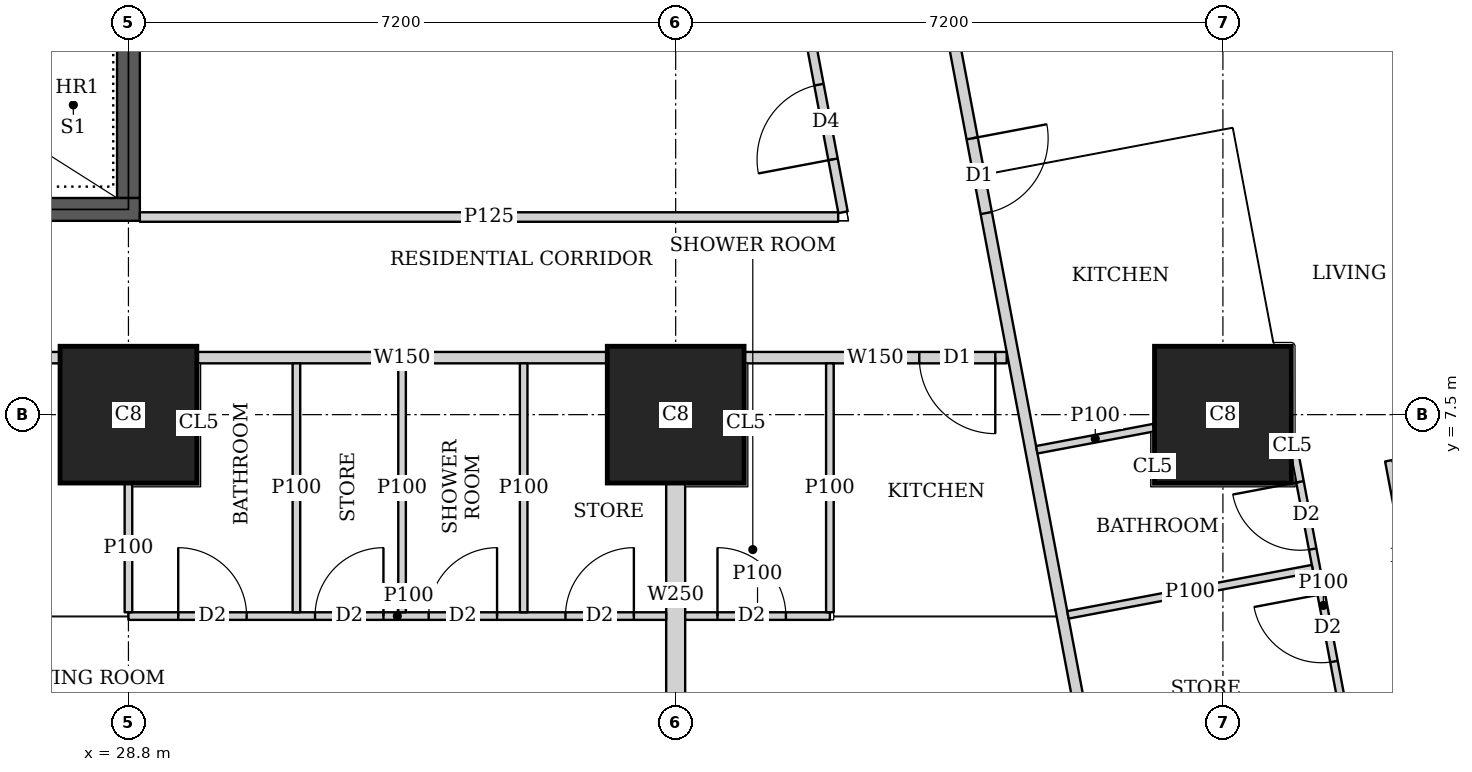
"""IFC4 building model, lengths in metres.
Left out: names, types, materials, properties, quantities, classifications, styles, units other than length and angle.
Written with IfcOpenShell. Run it as: python <this file> out.ifc"""

import sys

from ifc_helpers import new_model, si_unit, direction, frame, frame_2d, origin, origin_2d, place, context, subcontext, project, spatial, rectangle, extrude, element, fill, save


model = new_model("IFC4")
c1 = context("Model", 3, precision=1e-05, world=origin(), true_north=direction((0.0, 1.0)))
c2 = subcontext(c1, "Body", "Model", "MODEL_VIEW")
j1 = project(units=[si_unit("LENGTHUNIT", "METRE"), si_unit("PLANEANGLEUNIT", "RADIAN")], contexts=[c1])
p1 = place(None, origin())
s1 = spatial("IfcSite", under=j1, at=p1, CompositionType="ELEMENT")
p2 = place(p1, origin())
s2 = spatial("IfcBuilding", under=s1, at=p2, CompositionType="ELEMENT")
p3 = place(p2, frame((0.0, 0.0, 31.25)))
s3 = spatial("IfcBuildingStorey", under=s2, at=p3, CompositionType="ELEMENT", Elevation=31.25)
for number, where, z_axis, x_axis in (
    (1, (28.8, 7.5, 0.0), (0.0, 0.0, 1.0), (1.0, 0.0, 0.0)),
    (2, (36.0, 7.5, 0.0), (0.0, 0.0, 1.0), (1.0, 0.0, 0.0)),
    (3, (43.2, 7.5, 0.0), (0.0, 0.0, 1.0), (1.0, 0.0, 0.0)),
):
    element("IfcColumn", number, at=place(p3, frame(where, z_axis=z_axis, x_axis=x_axis)), inside=s3, PredefinedType="COLUMN", context=c2, shape_type="SweptSolid", body=[
        extrude(rectangle(XDim=1.8, YDim=1.8, at=origin_2d()), origin(), (0.0, 0.0, 1.0), 3.75),
    ])
p4 = place(p3, frame((21.45, 10.2, 0.0), z_axis=(0.0, 0.0, 1.0), x_axis=(1.0, 0.0, 0.0)))
e4 = element("IfcWall", 4, at=p4, inside=s3, PredefinedType="SHEAR", context=c2, shape_type="SweptSolid", body=[
    extrude(rectangle(XDim=7.5, YDim=0.3, at=frame_2d((3.75, 0.0))), origin(), (0.0, 0.0, 1.0), 3.75),
])
p5 = place(p4, frame((0.5, 0.0, 0.0)))
e5 = element("IfcOpeningElement", 5, at=p5, cuts=e4, PredefinedType="OPENING", context=c2, shape_type="SweptSolid", body=[
    extrude(rectangle(XDim=1.1, YDim=2.1, at=frame_2d((0.55, 1.05))), frame((0.0, 0.16, 0.0), z_axis=(0.0, -1.0, 0.0), x_axis=(1.0, 0.0, 0.0)), (0.0, 0.0, 1.0), 0.32),
])
p6 = place(p3, frame((28.8, 10.35, 0.0), z_axis=(0.0, 0.0, 1.0), x_axis=(0.0, 1.0, 0.0)))
e6 = element("IfcWall", 6, at=p6, inside=s3, PredefinedType="SHEAR", context=c2, shape_type="SweptSolid", body=[
    extrude(rectangle(XDim=4.2, YDim=0.3, at=frame_2d((2.1, 0.0))), origin(), (0.0, 0.0, 1.0), 3.75),
])
p7 = place(p3, frame((50.653, 2.703, 0.0), z_axis=(0.0, 0.0, 1.0), x_axis=(-0.185612026696, 0.982623109613, 0.0)))
e7 = element("IfcWall", 7, at=p7, inside=s3, PredefinedType="SOLIDWALL", context=c2, shape_type="SweptSolid", body=[
    extrude(rectangle(XDim=41.393, YDim=0.2, at=frame_2d((20.697, 0.0))), origin(), (0.0, 0.0, 1.0), 3.5),
])
p8 = place(p7, frame((1.633, 0.0, 0.9)))
e8 = element("IfcOpeningElement", 8, at=p8, cuts=e7, PredefinedType="OPENING", context=c2, shape_type="SweptSolid", body=[
    extrude(rectangle(XDim=1.8, YDim=1.5, at=frame_2d((0.9, 0.75))), frame((0.0, 0.11, 0.0), z_axis=(0.0, -1.0, 0.0), x_axis=(1.0, 0.0, 0.0)), (0.0, 0.0, 1.0), 0.22),
])
p9 = place(p7, frame((6.032, 0.0, 0.9)))
e9 = element("IfcOpeningElement", 9, at=p9, cuts=e7, PredefinedType="OPENING", context=c2, shape_type="SweptSolid", body=[
    extrude(rectangle(XDim=1.8, YDim=1.5, at=frame_2d((0.9, 0.75))), frame((0.0, 0.11, 0.0), z_axis=(0.0, -1.0, 0.0), x_axis=(1.0, 0.0, 0.0)), (0.0, 0.0, 1.0), 0.22),
])
p10 = place(p7, frame((9.848, 0.0, 0.9)))
e10 = element("IfcOpeningElement", 10, at=p10, cuts=e7, PredefinedType="OPENING", context=c2, shape_type="SweptSolid", body=[
    extrude(rectangle(XDim=1.8, YDim=1.5, at=frame_2d((0.9, 0.75))), frame((0.0, 0.11, 0.0), z_axis=(0.0, -1.0, 0.0), x_axis=(1.0, 0.0, 0.0)), (0.0, 0.0, 1.0), 0.22),
])
p11 = place(p7, frame((17.481, 0.0, 0.9)))
e11 = element("IfcOpeningElement", 11, at=p11, cuts=e7, PredefinedType="OPENING", context=c2, shape_type="SweptSolid", body=[
    extrude(rectangle(XDim=1.8, YDim=1.5, at=frame_2d((0.9, 0.75))), frame((0.0, 0.11, 0.0), z_axis=(0.0, -1.0, 0.0), x_axis=(1.0, 0.0, 0.0)), (0.0, 0.0, 1.0), 0.22),
])
p12 = place(p7, frame((21.297, 0.0, 0.9)))
e12 = element("IfcOpeningElement", 12, at=p12, cuts=e7, PredefinedType="OPENING", context=c2, shape_type="SweptSolid", body=[
    extrude(rectangle(XDim=1.8, YDim=1.5, at=frame_2d((0.9, 0.75))), frame((0.0, 0.11, 0.0), z_axis=(0.0, -1.0, 0.0), x_axis=(1.0, 0.0, 0.0)), (0.0, 0.0, 1.0), 0.22),
])
p13 = place(p7, frame((25.113, 0.0, 0.9)))
e13 = element("IfcOpeningElement", 13, at=p13, cuts=e7, PredefinedType="OPENING", context=c2, shape_type="SweptSolid", body=[
    extrude(rectangle(XDim=1.8, YDim=1.5, at=frame_2d((0.9, 0.75))), frame((0.0, 0.11, 0.0), z_axis=(0.0, -1.0, 0.0), x_axis=(1.0, 0.0, 0.0)), (0.0, 0.0, 1.0), 0.22),
])
p14 = place(p7, frame((28.93, 0.0, 0.9)))
e14 = element("IfcOpeningElement", 14, at=p14, cuts=e7, PredefinedType="OPENING", context=c2, shape_type="SweptSolid", body=[
    extrude(rectangle(XDim=1.8, YDim=1.5, at=frame_2d((0.9, 0.75))), frame((0.0, 0.11, 0.0), z_axis=(0.0, -1.0, 0.0), x_axis=(1.0, 0.0, 0.0)), (0.0, 0.0, 1.0), 0.22),
])
p15 = place(p7, frame((32.746, 0.0, 0.9)))
e15 = element("IfcOpeningElement", 15, at=p15, cuts=e7, PredefinedType="OPENING", context=c2, shape_type="SweptSolid", body=[
    extrude(rectangle(XDim=1.8, YDim=1.5, at=frame_2d((0.9, 0.75))), frame((0.0, 0.11, 0.0), z_axis=(0.0, -1.0, 0.0), x_axis=(1.0, 0.0, 0.0)), (0.0, 0.0, 1.0), 0.22),
])
p16 = place(p7, frame((36.481, 0.0, 0.9)))
e16 = element("IfcOpeningElement", 16, at=p16, cuts=e7, PredefinedType="OPENING", context=c2, shape_type="SweptSolid", body=[
    extrude(rectangle(XDim=1.8, YDim=1.5, at=frame_2d((0.9, 0.75))), frame((0.0, 0.11, 0.0), z_axis=(0.0, -1.0, 0.0), x_axis=(1.0, 0.0, 0.0)), (0.0, 0.0, 1.0), 0.22),
])
p17 = place(p3, frame((40.355, 8.25, 0.0), z_axis=(0.0, 0.0, 1.0), x_axis=(-1.0, 0.0, 0.0)))
e17 = element("IfcWall", 17, at=p17, inside=s3, PredefinedType="SOLIDWALL", context=c2, shape_type="SweptSolid", body=[
    extrude(rectangle(XDim=3.454, YDim=0.15, at=frame_2d((1.727, 0.0))), origin(), (0.0, 0.0, 1.0), 3.5),
])
p18 = place(p17, frame((0.15, 0.0, 0.0)))
e18 = element("IfcOpeningElement", 18, at=p18, cuts=e17, PredefinedType="OPENING", context=c2, shape_type="SweptSolid", body=[
    extrude(rectangle(XDim=1.0, YDim=2.1, at=frame_2d((0.5, 1.05))), frame((0.0, 0.085, 0.0), z_axis=(0.0, -1.0, 0.0), x_axis=(1.0, 0.0, 0.0)), (0.0, 0.0, 1.0), 0.17),
])
p19 = place(p3, frame((35.099, 8.25, 0.0), z_axis=(0.0, 0.0, 1.0), x_axis=(-1.0, 0.0, 0.0)))
e19 = element("IfcWall", 19, at=p19, inside=s3, PredefinedType="SOLIDWALL", context=c2, shape_type="SweptSolid", body=[
    extrude(rectangle(XDim=5.398, YDim=0.15, at=frame_2d((2.699, 0.0))), origin(), (0.0, 0.0, 1.0), 3.5),
])
p20 = place(p3, frame((27.899, 8.25, 0.0), z_axis=(0.0, 0.0, 1.0), x_axis=(-1.0, 0.0, 0.0)))
e20 = element("IfcWall", 20, at=p20, inside=s3, PredefinedType="SOLIDWALL", context=c2, shape_type="SweptSolid", body=[
    extrude(rectangle(XDim=5.398, YDim=0.15, at=frame_2d((2.699, 0.0))), origin(), (0.0, 0.0, 1.0), 3.5),
])
p21 = place(p20, frame((0.799, 0.0, 0.0)))
e21 = element("IfcOpeningElement", 21, at=p21, cuts=e20, PredefinedType="OPENING", context=c2, shape_type="SweptSolid", body=[
    extrude(rectangle(XDim=1.0, YDim=2.1, at=frame_2d((0.5, 1.05))), frame((0.0, 0.085, 0.0), z_axis=(0.0, -1.0, 0.0), x_axis=(1.0, 0.0, 0.0)), (0.0, 0.0, 1.0), 0.17),
])
p22 = place(p3, frame((35.094, 36.585, 0.0), z_axis=(0.0, 0.0, 1.0), x_axis=(0.185588860311, -0.982627485331, 0.0)))
e22 = element("IfcWall", 22, at=p22, inside=s3, PredefinedType="SOLIDWALL", context=c2, shape_type="SweptSolid", body=[
    extrude(rectangle(XDim=34.797, YDim=0.15, at=frame_2d((17.399, 0.0))), origin(), (0.0, 0.0, 1.0), 2.5),
])
p23 = place(p22, frame((6.012, 0.0, 0.0)))
e23 = element("IfcOpeningElement", 23, at=p23, cuts=e22, PredefinedType="OPENING", context=c2, shape_type="SweptSolid", body=[
    extrude(rectangle(XDim=1.0, YDim=2.1, at=frame_2d((0.5, 1.05))), frame((0.0, 0.085, 0.0), z_axis=(0.0, -1.0, 0.0), x_axis=(1.0, 0.0, 0.0)), (0.0, 0.0, 1.0), 0.17),
])
p24 = place(p22, frame((9.828, 0.0, 0.0)))
e24 = element("IfcOpeningElement", 24, at=p24, cuts=e22, PredefinedType="OPENING", context=c2, shape_type="SweptSolid", body=[
    extrude(rectangle(XDim=1.0, YDim=2.1, at=frame_2d((0.5, 1.05))), frame((0.0, 0.085, 0.0), z_axis=(0.0, -1.0, 0.0), x_axis=(1.0, 0.0, 0.0)), (0.0, 0.0, 1.0), 0.17),
])
p25 = place(p22, frame((25.9, 0.0, 0.0)))
e25 = element("IfcOpeningElement", 25, at=p25, cuts=e22, PredefinedType="OPENING", context=c2, shape_type="SweptSolid", body=[
    extrude(rectangle(XDim=1.0, YDim=2.1, at=frame_2d((0.5, 1.05))), frame((0.0, 0.085, 0.0), z_axis=(0.0, -1.0, 0.0), x_axis=(1.0, 0.0, 0.0)), (0.0, 0.0, 1.0), 0.17),
])
p26 = place(p3, frame((35.875, 4.85, 0.0), z_axis=(0.0, 0.0, 1.0), x_axis=(-1.0, 0.0, 0.0)))
e26 = element("IfcWall", 26, at=p26, inside=s3, PredefinedType="PARTITIONING", context=c2, shape_type="SweptSolid", body=[
    extrude(rectangle(XDim=7.075, YDim=0.1, at=frame_2d((3.538, 0.0))), origin(), (0.0, 0.0, 1.0), 3.5),
])
p27 = place(p26, frame((5.52, 0.0, 0.0)))
e27 = element("IfcOpeningElement", 27, at=p27, cuts=e26, PredefinedType="OPENING", context=c2, shape_type="SweptSolid", body=[
    extrude(rectangle(XDim=0.9, YDim=2.1, at=frame_2d((0.45, 1.05))), frame((0.0, 0.06, 0.0), z_axis=(0.0, -1.0, 0.0), x_axis=(1.0, 0.0, 0.0)), (0.0, 0.0, 1.0), 0.12),
])
p28 = place(p26, frame((2.225, 0.0, 0.0)))
e28 = element("IfcOpeningElement", 28, at=p28, cuts=e26, PredefinedType="OPENING", context=c2, shape_type="SweptSolid", body=[
    extrude(rectangle(XDim=0.9, YDim=2.1, at=frame_2d((0.45, 1.05))), frame((0.0, 0.06, 0.0), z_axis=(0.0, -1.0, 0.0), x_axis=(1.0, 0.0, 0.0)), (0.0, 0.0, 1.0), 0.12),
])
p29 = place(p26, frame((3.72, 0.0, 0.0)))
e29 = element("IfcOpeningElement", 29, at=p29, cuts=e26, PredefinedType="OPENING", context=c2, shape_type="SweptSolid", body=[
    extrude(rectangle(XDim=0.9, YDim=2.1, at=frame_2d((0.45, 1.05))), frame((0.0, 0.06, 0.0), z_axis=(0.0, -1.0, 0.0), x_axis=(1.0, 0.0, 0.0)), (0.0, 0.0, 1.0), 0.12),
])
p30 = place(p26, frame((0.425, 0.0, 0.0)))
e30 = element("IfcOpeningElement", 30, at=p30, cuts=e26, PredefinedType="OPENING", context=c2, shape_type="SweptSolid", body=[
    extrude(rectangle(XDim=0.9, YDim=2.1, at=frame_2d((0.45, 1.05))), frame((0.0, 0.06, 0.0), z_axis=(0.0, -1.0, 0.0), x_axis=(1.0, 0.0, 0.0)), (0.0, 0.0, 1.0), 0.12),
])
p31 = place(p3, frame((28.8, 4.9, 0.0), z_axis=(0.0, 0.0, 1.0), x_axis=(0.0, 1.0, 0.0)))
e31 = element("IfcWall", 31, at=p31, inside=s3, PredefinedType="PARTITIONING", context=c2, shape_type="SweptSolid", body=[
    extrude(rectangle(XDim=1.699, YDim=0.1, at=frame_2d((0.85, 0.0))), origin(), (0.0, 0.0, 1.0), 3.5),
])
for number, where, z_axis, x_axis in (
    (32, (32.4, 4.9, 0.0), (0.0, 0.0, 1.0), (0.0, 1.0, 0.0)),
    (33, (31.01, 4.9, 0.0), (0.0, 0.0, 1.0), (0.0, 1.0, 0.0)),
    (34, (34.0, 4.9, 0.0), (0.0, 0.0, 1.0), (0.0, 1.0, 0.0)),
):
    element("IfcWall", number, at=place(p3, frame(where, z_axis=z_axis, x_axis=x_axis)), inside=s3, PredefinedType="PARTITIONING", context=c2, shape_type="SweptSolid", body=[
        extrude(rectangle(XDim=3.275, YDim=0.1, at=frame_2d((1.638, 0.0))), origin(), (0.0, 0.0, 1.0), 3.5),
    ])
p32 = place(p3, frame((38.029, 4.85, 0.0), z_axis=(0.0, 0.0, 1.0), x_axis=(-1.0, 0.0, 0.0)))
e35 = element("IfcWall", 35, at=p32, inside=s3, PredefinedType="PARTITIONING", context=c2, shape_type="SweptSolid", body=[
    extrude(rectangle(XDim=1.904, YDim=0.1, at=frame_2d((0.952, 0.0))), origin(), (0.0, 0.0, 1.0), 3.5),
])
p33 = place(p32, frame((0.579, 0.0, 0.0)))
e36 = element("IfcOpeningElement", 36, at=p33, cuts=e35, PredefinedType="OPENING", context=c2, shape_type="SweptSolid", body=[
    extrude(rectangle(XDim=0.9, YDim=2.1, at=frame_2d((0.45, 1.05))), frame((0.0, 0.06, 0.0), z_axis=(0.0, -1.0, 0.0), x_axis=(1.0, 0.0, 0.0)), (0.0, 0.0, 1.0), 0.12),
])
p34 = place(p3, frame((38.029, 4.9, 0.0), z_axis=(0.0, 0.0, 1.0), x_axis=(0.0, 1.0, 0.0)))
e37 = element("IfcWall", 37, at=p34, inside=s3, PredefinedType="PARTITIONING", context=c2, shape_type="SweptSolid", body=[
    extrude(rectangle(XDim=3.275, YDim=0.1, at=frame_2d((1.638, 0.0))), origin(), (0.0, 0.0, 1.0), 3.5),
])
p35 = place(p3, frame((36.0, 3.65, 0.0), z_axis=(0.0, 0.0, 1.0), x_axis=(0.0, 1.0, 0.0)))
e38 = element("IfcWall", 38, at=p35, inside=s3, PredefinedType="SOLIDWALL", context=c2, shape_type="SweptSolid", body=[
    extrude(rectangle(XDim=2.949, YDim=0.25, at=frame_2d((1.475, 0.0))), origin(), (0.0, 0.0, 1.0), 3.5),
])
p36 = place(p3, frame((45.383, 6.894, 0.0), z_axis=(0.0, 0.0, 1.0), x_axis=(0.185791461635, -0.982589198385, 0.0)))
e39 = element("IfcWall", 39, at=p36, inside=s3, PredefinedType="PARTITIONING", context=c2, shape_type="SweptSolid", body=[
    extrude(rectangle(XDim=3.687, YDim=0.1, at=frame_2d((1.844, 0.0))), origin(), (0.0, 0.0, 1.0), 3.5),
])
p37 = place(p36, frame((1.3, 0.0, 0.0)))
e40 = element("IfcOpeningElement", 40, at=p37, cuts=e39, PredefinedType="OPENING", context=c2, shape_type="SweptSolid", body=[
    extrude(rectangle(XDim=0.9, YDim=2.1, at=frame_2d((0.45, 1.05))), frame((0.0, 0.06, 0.0), z_axis=(0.0, -1.0, 0.0), x_axis=(1.0, 0.0, 0.0)), (0.0, 0.0, 1.0), 0.12),
])
p38 = place(p3, frame((44.149, 6.96, 0.0), z_axis=(0.0, 0.0, 1.0), x_axis=(0.185824941804, -0.982582867245, 0.0)))
e41 = element("IfcWall", 41, at=p38, inside=s3, PredefinedType="PARTITIONING", context=c2, shape_type="SweptSolid", body=[
    extrude(rectangle(XDim=4.01, YDim=0.1, at=frame_2d((2.005, 0.0))), origin(), (0.0, 0.0, 1.0), 3.5),
])
p39 = place(p38, frame((0.35, 0.0, 0.0)))
e42 = element("IfcOpeningElement", 42, at=p39, cuts=e41, PredefinedType="OPENING", context=c2, shape_type="SweptSolid", body=[
    extrude(rectangle(XDim=0.9, YDim=2.1, at=frame_2d((0.45, 1.05))), frame((0.0, 0.06, 0.0), z_axis=(0.0, -1.0, 0.0), x_axis=(1.0, 0.0, 0.0)), (0.0, 0.0, 1.0), 0.12),
])
p40 = place(p38, frame((1.856, 0.0, 0.0)))
e43 = element("IfcOpeningElement", 43, at=p40, cuts=e41, PredefinedType="OPENING", context=c2, shape_type="SweptSolid", body=[
    extrude(rectangle(XDim=0.9, YDim=2.1, at=frame_2d((0.45, 1.05))), frame((0.0, 0.06, 0.0), z_axis=(0.0, -1.0, 0.0), x_axis=(1.0, 0.0, 0.0)), (0.0, 0.0, 1.0), 0.12),
])
p41 = place(p3, frame((42.29, 7.329, 0.0), z_axis=(0.0, 0.0, 1.0), x_axis=(-0.98258870752, -0.18579405764, 0.0)))
e44 = element("IfcWall", 44, at=p41, inside=s3, PredefinedType="PARTITIONING", context=c2, shape_type="SweptSolid", body=[
    extrude(rectangle(XDim=1.566, YDim=0.1, at=frame_2d((0.783, 0.0))), origin(), (0.0, 0.0, 1.0), 3.5),
])
p42 = place(p3, frame((44.379, 5.474, 0.0), z_axis=(0.0, 0.0, 1.0), x_axis=(-0.982607026909, -0.185697147715, 0.0)))
e45 = element("IfcWall", 45, at=p42, inside=s3, PredefinedType="PARTITIONING", context=c2, shape_type="SweptSolid", body=[
    extrude(rectangle(XDim=3.275, YDim=0.1, at=frame_2d((1.637, 0.0))), origin(), (0.0, 0.0, 1.0), 3.5),
])
p43 = place(p3, frame((28.95, 10.1, 0.0), z_axis=(0.0, 0.0, 1.0), x_axis=(1.0, 0.0, 0.0)))
e46 = element("IfcWall", 46, at=p43, inside=s3, PredefinedType="PARTITIONING", context=c2, shape_type="SweptSolid", body=[
    extrude(rectangle(XDim=9.188, YDim=0.125, at=frame_2d((4.594, 0.0))), origin(), (0.0, 0.0, 1.0), 3.5),
])
p44 = place(p3, frame((38.202, 10.163, 0.0), z_axis=(0.0, 0.0, 1.0), x_axis=(-0.185610321132, 0.982623431783, 0.0)))
e47 = element("IfcWall", 47, at=p44, inside=s3, PredefinedType="PARTITIONING", context=c2, shape_type="SweptSolid", body=[
    extrude(rectangle(XDim=25.111, YDim=0.125, at=frame_2d((12.556, 0.0))), origin(), (0.0, 0.0, 1.0), 2.5),
])
p45 = place(p44, frame((0.708, 0.0, 0.0)))
e48 = element("IfcOpeningElement", 48, at=p45, cuts=e47, PredefinedType="OPENING", context=c2, shape_type="SweptSolid", body=[
    extrude(rectangle(XDim=1.0, YDim=2.1, at=frame_2d((0.5, 1.05))), frame((0.0, 0.073, 0.0), z_axis=(0.0, -1.0, 0.0), x_axis=(1.0, 0.0, 0.0)), (0.0, 0.0, 1.0), 0.145),
])
p46 = place(p44, frame((6.1, 0.0, 0.0)))
e49 = element("IfcOpeningElement", 49, at=p46, cuts=e47, PredefinedType="OPENING", context=c2, shape_type="SweptSolid", body=[
    extrude(rectangle(XDim=1.0, YDim=2.1, at=frame_2d((0.5, 1.05))), frame((0.0, 0.073, 0.0), z_axis=(0.0, -1.0, 0.0), x_axis=(1.0, 0.0, 0.0)), (0.0, 0.0, 1.0), 0.145),
])
p47 = place(p44, frame((13.378, 0.0, 0.0)))
e50 = element("IfcOpeningElement", 50, at=p47, cuts=e47, PredefinedType="OPENING", context=c2, shape_type="SweptSolid", body=[
    extrude(rectangle(XDim=1.0, YDim=2.1, at=frame_2d((0.5, 1.05))), frame((0.0, 0.073, 0.0), z_axis=(0.0, -1.0, 0.0), x_axis=(1.0, 0.0, 0.0)), (0.0, 0.0, 1.0), 0.145),
])
p48 = place(p44, frame((17.194, 0.0, 0.0)))
e51 = element("IfcOpeningElement", 51, at=p48, cuts=e47, PredefinedType="OPENING", context=c2, shape_type="SweptSolid", body=[
    extrude(rectangle(XDim=1.0, YDim=2.1, at=frame_2d((0.5, 1.05))), frame((0.0, 0.073, 0.0), z_axis=(0.0, -1.0, 0.0), x_axis=(1.0, 0.0, 0.0)), (0.0, 0.0, 1.0), 0.145),
])
p49 = place(p44, frame((21.35, 0.0, 0.0)))
e52 = element("IfcOpeningElement", 52, at=p49, cuts=e47, PredefinedType="OPENING", context=c2, shape_type="SweptSolid", body=[
    extrude(rectangle(XDim=1.0, YDim=2.1, at=frame_2d((0.5, 1.05))), frame((0.0, 0.073, 0.0), z_axis=(0.0, -1.0, 0.0), x_axis=(1.0, 0.0, 0.0)), (0.0, 0.0, 1.0), 0.145),
])
p50 = place(p27, origin())
e53 = element("IfcDoor", 53, at=p50, inside=s3, OperationType="SINGLE_SWING_LEFT", PredefinedType="DOOR", context=c2, shape_type="SweptSolid", body=[
    extrude(rectangle(XDim=0.9, YDim=2.1, at=frame_2d((0.45, 1.05))), frame((0.0, 0.025, 0.0), z_axis=(0.0, -1.0, 0.0), x_axis=(1.0, 0.0, 0.0)), (0.0, 0.0, 1.0), 0.05),
])
fill(e27, e53)
p51 = place(p28, origin())
e54 = element("IfcDoor", 54, at=p51, inside=s3, OperationType="SINGLE_SWING_RIGHT", PredefinedType="DOOR", context=c2, shape_type="SweptSolid", body=[
    extrude(rectangle(XDim=0.9, YDim=2.1, at=frame_2d((0.45, 1.05))), frame((0.0, 0.025, 0.0), z_axis=(0.0, -1.0, 0.0), x_axis=(1.0, 0.0, 0.0)), (0.0, 0.0, 1.0), 0.05),
])
fill(e28, e54)
p52 = place(p29, origin())
e55 = element("IfcDoor", 55, at=p52, inside=s3, OperationType="SINGLE_SWING_RIGHT", PredefinedType="DOOR", context=c2, shape_type="SweptSolid", body=[
    extrude(rectangle(XDim=0.9, YDim=2.1, at=frame_2d((0.45, 1.05))), frame((0.0, 0.025, 0.0), z_axis=(0.0, -1.0, 0.0), x_axis=(1.0, 0.0, 0.0)), (0.0, 0.0, 1.0), 0.05),
])
fill(e29, e55)
p53 = place(p30, origin())
e56 = element("IfcDoor", 56, at=p53, inside=s3, OperationType="SINGLE_SWING_RIGHT", PredefinedType="DOOR", context=c2, shape_type="SweptSolid", body=[
    extrude(rectangle(XDim=0.9, YDim=2.1, at=frame_2d((0.45, 1.05))), frame((0.0, 0.025, 0.0), z_axis=(0.0, -1.0, 0.0), x_axis=(1.0, 0.0, 0.0)), (0.0, 0.0, 1.0), 0.05),
])
fill(e30, e56)
p54 = place(p33, origin())
e57 = element("IfcDoor", 57, at=p54, inside=s3, OperationType="SINGLE_SWING_LEFT", PredefinedType="DOOR", context=c2, shape_type="SweptSolid", body=[
    extrude(rectangle(XDim=0.9, YDim=2.1, at=frame_2d((0.45, 1.05))), frame((0.0, 0.025, 0.0), z_axis=(0.0, -1.0, 0.0), x_axis=(1.0, 0.0, 0.0)), (0.0, 0.0, 1.0), 0.05),
])
fill(e36, e57)
p55 = place(p18, origin())
e58 = element("IfcDoor", 58, at=p55, inside=s3, OperationType="SINGLE_SWING_LEFT", PredefinedType="DOOR", context=c2, shape_type="SweptSolid", body=[
    extrude(rectangle(XDim=1.0, YDim=2.1, at=frame_2d((0.5, 1.05))), frame((0.0, 0.025, 0.0), z_axis=(0.0, -1.0, 0.0), x_axis=(1.0, 0.0, 0.0)), (0.0, 0.0, 1.0), 0.05),
])
fill(e18, e58)
p56 = place(p39, origin())
e59 = element("IfcDoor", 59, at=p56, inside=s3, OperationType="SINGLE_SWING_RIGHT", PredefinedType="DOOR", context=c2, shape_type="SweptSolid", body=[
    extrude(rectangle(XDim=0.9, YDim=2.1, at=frame_2d((0.45, 1.05))), frame((0.0, 0.025, 0.0), z_axis=(0.0, -1.0, 0.0), x_axis=(1.0, 0.0, 0.0)), (0.0, 0.0, 1.0), 0.05),
])
fill(e42, e59)
p57 = place(p40, origin())
e60 = element("IfcDoor", 60, at=p57, inside=s3, OperationType="SINGLE_SWING_RIGHT", PredefinedType="DOOR", context=c2, shape_type="SweptSolid", body=[
    extrude(rectangle(XDim=0.9, YDim=2.1, at=frame_2d((0.45, 1.05))), frame((0.0, 0.025, 0.0), z_axis=(0.0, -1.0, 0.0), x_axis=(1.0, 0.0, 0.0)), (0.0, 0.0, 1.0), 0.05),
])
fill(e43, e60)
p58 = place(p25, origin())
e61 = element("IfcDoor", 61, at=p58, inside=s3, OperationType="SINGLE_SWING_LEFT", PredefinedType="DOOR", context=c2, shape_type="SweptSolid", body=[
    extrude(rectangle(XDim=1.0, YDim=2.1, at=frame_2d((0.5, 1.05))), frame((0.0, 0.025, 0.0), z_axis=(0.0, -1.0, 0.0), x_axis=(1.0, 0.0, 0.0)), (0.0, 0.0, 1.0), 0.05),
])
fill(e25, e61)
p59 = place(p45, origin())
e62 = element("IfcDoor", 62, at=p59, inside=s3, OperationType="SINGLE_SWING_LEFT", PredefinedType="DOOR", context=c2, shape_type="SweptSolid", body=[
    extrude(rectangle(XDim=1.0, YDim=2.1, at=frame_2d((0.5, 1.05))), frame((0.0, 0.025, 0.0), z_axis=(0.0, -1.0, 0.0), x_axis=(1.0, 0.0, 0.0)), (0.0, 0.0, 1.0), 0.05),
])
fill(e48, e62)
save(model, sys.argv[1])
